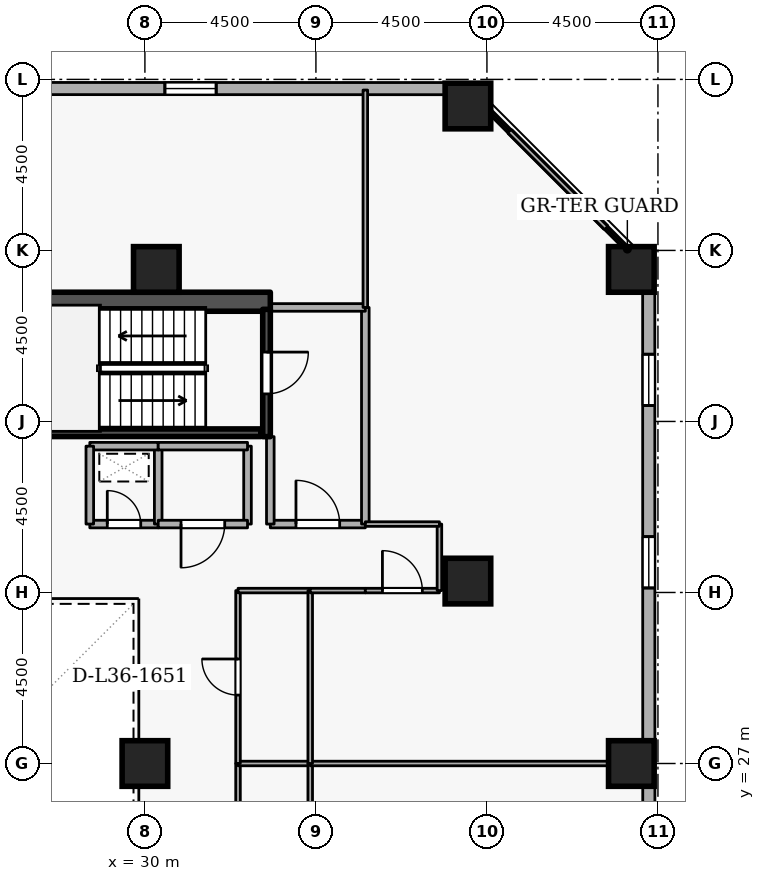
"""IFC4 building model, lengths in metres.
Left out: names, types, materials, properties, quantities, classifications, styles, units other than length and angle.
Written with IfcOpenShell. Run it as: python <this file> out.ifc"""

import sys

from ifc_helpers import new_model, si_unit, direction, frame, frame_2d, origin, origin_2d, place, context, subcontext, project, spatial, rectangle, extrude, element, fill, save


model = new_model("IFC4")
c1 = context("Model", 3, precision=1e-05, world=origin(), true_north=direction((0.0, 1.0)))
c2 = subcontext(c1, "Body", "Model", "MODEL_VIEW")
j1 = project(units=[si_unit("LENGTHUNIT", "METRE"), si_unit("PLANEANGLEUNIT", "RADIAN")], contexts=[c1])
p1 = place(None, origin())
s1 = spatial("IfcSite", under=j1, at=p1, CompositionType="ELEMENT")
p2 = place(p1, origin())
s2 = spatial("IfcBuilding", under=s1, at=p2, CompositionType="ELEMENT")
p3 = place(p2, frame((0.0, 0.0, 137.7)))
s3 = spatial("IfcBuildingStorey", under=s2, at=p3, CompositionType="ELEMENT", Elevation=137.7)
p4 = place(p3, frame((17.7, 39.15, 0.0), z_axis=(0.0, 0.0, 1.0), x_axis=(1.0, 0.0, 0.0)))
e1 = element("IfcWall", 1, at=p4, inside=s3, PredefinedType="SHEAR", context=c2, shape_type="SweptSolid", body=[
    extrude(rectangle(XDim=15.6, YDim=0.5, at=frame_2d((7.8, 0.0))), origin(), (0.0, 0.0, 1.0), 3.6),
])
for number, where, z_axis, x_axis in (
    (2, (42.8, 27.0, 0.0), (0.0, 0.0, 1.0), (1.0, 0.0, 0.0)),
    (3, (42.8, 40.0, 0.0), (0.0, 0.0, 1.0), (1.0, 0.0, 0.0)),
    (4, (38.5, 44.3, 0.0), (0.0, 0.0, 1.0), (1.0, 0.0, 0.0)),
    (5, (38.5, 31.8, 0.0), (0.0, 0.0, 1.0), (1.0, 0.0, 0.0)),
    (6, (30.3, 40.0, 0.0), (0.0, 0.0, 1.0), (1.0, 0.0, 0.0)),
    (7, (30.0, 27.0, 0.0), (0.0, 0.0, 1.0), (1.0, 0.0, 0.0)),
):
    element("IfcColumn", number, at=place(p3, frame(where, z_axis=z_axis, x_axis=x_axis)), inside=s3, PredefinedType="COLUMN", context=c2, shape_type="SweptSolid", body=[
        extrude(rectangle(XDim=1.2, YDim=1.2, at=origin_2d()), origin(), (0.0, 0.0, 1.0), 3.6),
    ])
p5 = place(p3, frame((43.265, 5.819, 0.0), z_axis=(0.0, 0.0, 1.0), x_axis=(-0.000214431216, 0.99999997701, 0.0)))
e8 = element("IfcWall", 8, at=p5, inside=s3, PredefinedType="STANDARD", context=c2, shape_type="SweptSolid", body=[
    extrude(rectangle(XDim=34.156, YDim=0.32, at=frame_2d((17.078, 0.0))), origin(), (0.0, 0.0, 1.0), 2.66),
])
p6 = place(p5, frame((1.8, 0.0, 0.72)))
e9 = element("IfcOpeningElement", 9, at=p6, cuts=e8, PredefinedType="OPENING", context=c2, shape_type="SweptSolid", body=[
    extrude(rectangle(XDim=1.35, YDim=1.05, at=frame_2d((0.675, 0.525))), frame((0.0, 0.17, 0.0), z_axis=(0.0, -1.0, 0.0), x_axis=(1.0, 0.0, 0.0)), (0.0, 0.0, 1.0), 0.34),
])
p7 = place(p5, frame((11.4, 0.0, 0.72)))
e10 = element("IfcOpeningElement", 10, at=p7, cuts=e8, PredefinedType="OPENING", context=c2, shape_type="SweptSolid", body=[
    extrude(rectangle(XDim=1.35, YDim=1.05, at=frame_2d((0.675, 0.525))), frame((0.0, 0.17, 0.0), z_axis=(0.0, -1.0, 0.0), x_axis=(1.0, 0.0, 0.0)), (0.0, 0.0, 1.0), 0.34),
])
p8 = place(p5, frame((16.2, 0.0, 0.72)))
e11 = element("IfcOpeningElement", 11, at=p8, cuts=e8, PredefinedType="OPENING", context=c2, shape_type="SweptSolid", body=[
    extrude(rectangle(XDim=1.35, YDim=1.05, at=frame_2d((0.675, 0.525))), frame((0.0, 0.17, 0.0), z_axis=(0.0, -1.0, 0.0), x_axis=(1.0, 0.0, 0.0)), (0.0, 0.0, 1.0), 0.34),
])
p9 = place(p5, frame((25.8, 0.0, 0.72)))
e12 = element("IfcOpeningElement", 12, at=p9, cuts=e8, PredefinedType="OPENING", context=c2, shape_type="SweptSolid", body=[
    extrude(rectangle(XDim=1.35, YDim=1.05, at=frame_2d((0.675, 0.525))), frame((0.0, 0.17, 0.0), z_axis=(0.0, -1.0, 0.0), x_axis=(1.0, 0.0, 0.0)), (0.0, 0.0, 1.0), 0.34),
])
p10 = place(p5, frame((30.6, 0.0, 0.72)))
e13 = element("IfcOpeningElement", 13, at=p10, cuts=e8, PredefinedType="OPENING", context=c2, shape_type="SweptSolid", body=[
    extrude(rectangle(XDim=1.35, YDim=1.05, at=frame_2d((0.675, 0.525))), frame((0.0, 0.17, 0.0), z_axis=(0.0, -1.0, 0.0), x_axis=(1.0, 0.0, 0.0)), (0.0, 0.0, 1.0), 0.34),
])
p11 = place(p3, frame((38.475, 44.757, 0.0), z_axis=(0.0, 0.0, 1.0), x_axis=(-0.99999997701, 0.000214431216, 0.0)))
e14 = element("IfcWall", 14, at=p11, inside=s3, PredefinedType="STANDARD", context=c2, shape_type="SweptSolid", body=[
    extrude(rectangle(XDim=34.156, YDim=0.32, at=frame_2d((17.078, 0.0))), origin(), (0.0, 0.0, 1.0), 2.66),
])
p12 = place(p11, frame((6.6, 0.0, 0.72)))
e15 = element("IfcOpeningElement", 15, at=p12, cuts=e14, PredefinedType="OPENING", context=c2, shape_type="SweptSolid", body=[
    extrude(rectangle(XDim=1.35, YDim=1.05, at=frame_2d((0.675, 0.525))), frame((0.0, 0.17, 0.0), z_axis=(0.0, -1.0, 0.0), x_axis=(1.0, 0.0, 0.0)), (0.0, 0.0, 1.0), 0.34),
])
p13 = place(p11, frame((16.2, 0.0, 0.72)))
e16 = element("IfcOpeningElement", 16, at=p13, cuts=e14, PredefinedType="OPENING", context=c2, shape_type="SweptSolid", body=[
    extrude(rectangle(XDim=1.35, YDim=1.05, at=frame_2d((0.675, 0.525))), frame((0.0, 0.17, 0.0), z_axis=(0.0, -1.0, 0.0), x_axis=(1.0, 0.0, 0.0)), (0.0, 0.0, 1.0), 0.34),
])
p14 = place(p11, frame((21.0, 0.0, 0.72)))
e17 = element("IfcOpeningElement", 17, at=p14, cuts=e14, PredefinedType="OPENING", context=c2, shape_type="SweptSolid", body=[
    extrude(rectangle(XDim=1.35, YDim=1.05, at=frame_2d((0.675, 0.525))), frame((0.0, 0.17, 0.0), z_axis=(0.0, -1.0, 0.0), x_axis=(1.0, 0.0, 0.0)), (0.0, 0.0, 1.0), 0.34),
])
p15 = place(p11, frame((30.6, 0.0, 0.72)))
e18 = element("IfcOpeningElement", 18, at=p15, cuts=e14, PredefinedType="OPENING", context=c2, shape_type="SweptSolid", body=[
    extrude(rectangle(XDim=1.35, YDim=1.05, at=frame_2d((0.675, 0.525))), frame((0.0, 0.17, 0.0), z_axis=(0.0, -1.0, 0.0), x_axis=(1.0, 0.0, 0.0)), (0.0, 0.0, 1.0), 0.34),
])
p16 = place(p3, frame((33.2, 38.95, 0.0), z_axis=(0.0, 0.0, 1.0), x_axis=(0.0, -1.0, 0.0)))
e19 = element("IfcWall", 19, at=p16, inside=s3, PredefinedType="SHEAR", context=c2, shape_type="SweptSolid", body=[
    extrude(rectangle(XDim=3.35, YDim=0.2, at=frame_2d((1.675, 0.0))), origin(), (0.0, 0.0, 1.0), 3.6),
])
p17 = place(p16, frame((1.125, 0.0, 0.0)))
e20 = element("IfcOpeningElement", 20, at=p17, cuts=e19, PredefinedType="OPENING", context=c2, shape_type="SweptSolid", body=[
    extrude(rectangle(XDim=1.1, YDim=2.1, at=frame_2d((0.55, 1.05))), frame((0.0, 0.11, 0.0), z_axis=(0.0, -1.0, 0.0), x_axis=(1.0, 0.0, 0.0)), (0.0, 0.0, 1.0), 0.22),
])
p18 = place(p3, frame((25.95, 35.703, 0.0), z_axis=(0.0, 0.0, 1.0), x_axis=(1.0, 0.0, 0.0)))
e21 = element("IfcWall", 21, at=p18, inside=s3, PredefinedType="SHEAR", context=c2, shape_type="SweptSolid", body=[
    extrude(rectangle(XDim=7.1, YDim=0.2, at=frame_2d((3.55, 0.0))), origin(), (0.0, 0.0, 1.0), 3.6),
])
p19 = place(p3, frame((33.3, 33.3, 0.0), z_axis=(0.0, 0.0, 1.0), x_axis=(1.0, 0.0, 0.0)))
e22 = element("IfcWall", 22, at=p19, inside=s3, PredefinedType="STANDARD", context=c2, shape_type="SweptSolid", body=[
    extrude(rectangle(XDim=2.5, YDim=0.2, at=frame_2d((1.25, 0.0))), origin(), (0.0, 0.0, 1.0), 3.26),
])
p20 = place(p19, frame((0.675, 0.0, 0.0)))
e23 = element("IfcOpeningElement", 23, at=p20, cuts=e22, PredefinedType="OPENING", context=c2, shape_type="SweptSolid", body=[
    extrude(rectangle(XDim=1.15, YDim=2.1, at=frame_2d((0.575, 1.05))), frame((0.0, 0.11, 0.0), z_axis=(0.0, -1.0, 0.0), x_axis=(1.0, 0.0, 0.0)), (0.0, 0.0, 1.0), 0.22),
])
p21 = place(p3, frame((35.8, 33.3, 0.0), z_axis=(0.0, 0.0, 1.0), x_axis=(0.0, 1.0, 0.0)))
e24 = element("IfcWall", 24, at=p21, inside=s3, PredefinedType="STANDARD", context=c2, shape_type="SweptSolid", body=[
    extrude(rectangle(XDim=5.7, YDim=0.2, at=frame_2d((2.85, 0.0))), origin(), (0.0, 0.0, 1.0), 3.26),
])
p22 = place(p3, frame((35.8, 39.0, 0.0), z_axis=(0.0, 0.0, 1.0), x_axis=(-1.0, 0.0, 0.0)))
e25 = element("IfcWall", 25, at=p22, inside=s3, PredefinedType="STANDARD", context=c2, shape_type="SweptSolid", body=[
    extrude(rectangle(XDim=2.5, YDim=0.2, at=frame_2d((1.25, 0.0))), origin(), (0.0, 0.0, 1.0), 3.26),
])
p23 = place(p3, frame((33.3, 35.6, 0.0), z_axis=(0.0, 0.0, 1.0), x_axis=(0.0, -1.0, 0.0)))
e26 = element("IfcWall", 26, at=p23, inside=s3, PredefinedType="STANDARD", context=c2, shape_type="SweptSolid", body=[
    extrude(rectangle(XDim=2.3, YDim=0.2, at=frame_2d((1.15, 0.0))), origin(), (0.0, 0.0, 1.0), 2.465),
])
p24 = place(p3, frame((28.55, 33.3, 0.0), z_axis=(0.0, 0.0, 1.0), x_axis=(1.0, 0.0, 0.0)))
e27 = element("IfcWall", 27, at=p24, inside=s3, PredefinedType="STANDARD", context=c2, shape_type="SweptSolid", body=[
    extrude(rectangle(XDim=1.8, YDim=0.2, at=frame_2d((0.9, 0.0))), origin(), (0.0, 0.0, 1.0), 3.26),
])
p25 = place(p24, frame((0.46, 0.0, 0.0)))
e28 = element("IfcOpeningElement", 28, at=p25, cuts=e27, PredefinedType="OPENING", context=c2, shape_type="SweptSolid", body=[
    extrude(rectangle(XDim=0.88, YDim=2.04, at=frame_2d((0.44, 1.02))), frame((0.0, 0.11, 0.0), z_axis=(0.0, -1.0, 0.0), x_axis=(1.0, 0.0, 0.0)), (0.0, 0.0, 1.0), 0.22),
])
p26 = place(p3, frame((30.35, 33.3, 0.0), z_axis=(0.0, 0.0, 1.0), x_axis=(0.0, 1.0, 0.0)))
e29 = element("IfcWall", 29, at=p26, inside=s3, PredefinedType="STANDARD", context=c2, shape_type="SweptSolid", body=[
    extrude(rectangle(XDim=2.05, YDim=0.2, at=frame_2d((1.025, 0.0))), origin(), (0.0, 0.0, 1.0), 3.26),
])
p27 = place(p3, frame((30.35, 35.35, 0.0), z_axis=(0.0, 0.0, 1.0), x_axis=(-1.0, 0.0, 0.0)))
e30 = element("IfcWall", 30, at=p27, inside=s3, PredefinedType="STANDARD", context=c2, shape_type="SweptSolid", body=[
    extrude(rectangle(XDim=1.8, YDim=0.2, at=frame_2d((0.9, 0.0))), origin(), (0.0, 0.0, 1.0), 3.26),
])
p28 = place(p3, frame((28.55, 35.35, 0.0), z_axis=(0.0, 0.0, 1.0), x_axis=(0.0, -1.0, 0.0)))
e31 = element("IfcWall", 31, at=p28, inside=s3, PredefinedType="STANDARD", context=c2, shape_type="SweptSolid", body=[
    extrude(rectangle(XDim=2.05, YDim=0.2, at=frame_2d((1.025, 0.0))), origin(), (0.0, 0.0, 1.0), 3.26),
])
p29 = place(p3, frame((32.7, 35.35, 0.0), z_axis=(0.0, 0.0, 1.0), x_axis=(0.0, -1.0, 0.0)))
e32 = element("IfcWall", 32, at=p29, inside=s3, PredefinedType="STANDARD", context=c2, shape_type="SweptSolid", body=[
    extrude(rectangle(XDim=2.05, YDim=0.2, at=frame_2d((1.025, 0.0))), origin(), (0.0, 0.0, 1.0), 2.465),
])
p30 = place(p3, frame((32.7, 33.3, 0.0), z_axis=(0.0, 0.0, 1.0), x_axis=(-1.0, 0.0, 0.0)))
e33 = element("IfcWall", 33, at=p30, inside=s3, PredefinedType="STANDARD", context=c2, shape_type="SweptSolid", body=[
    extrude(rectangle(XDim=2.35, YDim=0.2, at=frame_2d((1.175, 0.0))), origin(), (0.0, 0.0, 1.0), 3.26),
])
p31 = place(p30, frame((0.6, 0.0, 0.0)))
e34 = element("IfcOpeningElement", 34, at=p31, cuts=e33, PredefinedType="OPENING", context=c2, shape_type="SweptSolid", body=[
    extrude(rectangle(XDim=1.15, YDim=2.1, at=frame_2d((0.575, 1.05))), frame((0.0, 0.11, 0.0), z_axis=(0.0, -1.0, 0.0), x_axis=(1.0, 0.0, 0.0)), (0.0, 0.0, 1.0), 0.22),
])
p32 = place(p3, frame((30.35, 35.35, 0.0), z_axis=(0.0, 0.0, 1.0), x_axis=(1.0, 0.0, 0.0)))
e35 = element("IfcWall", 35, at=p32, inside=s3, PredefinedType="STANDARD", context=c2, shape_type="SweptSolid", body=[
    extrude(rectangle(XDim=2.35, YDim=0.2, at=frame_2d((1.175, 0.0))), origin(), (0.0, 0.0, 1.0), 3.26),
])
p33 = place(p3, frame((32.45, 22.45, 0.0), z_axis=(0.0, 0.0, 1.0), x_axis=(0.0, 1.0, 0.0)))
e36 = element("IfcWall", 36, at=p33, inside=s3, PredefinedType="PARTITIONING", context=c2, shape_type="SweptSolid", body=[
    extrude(rectangle(XDim=4.55, YDim=0.12, at=frame_2d((2.275, 0.0))), origin(), (0.0, 0.0, 1.0), 3.26),
])
p34 = place(p33, frame((1.8, 0.0, 0.0)))
e37 = element("IfcOpeningElement", 37, at=p34, cuts=e36, PredefinedType="OPENING", context=c2, shape_type="SweptSolid", body=[
    extrude(rectangle(XDim=0.95, YDim=2.1, at=frame_2d((0.475, 1.05))), frame((0.0, 0.07, 0.0), z_axis=(0.0, -1.0, 0.0), x_axis=(1.0, 0.0, 0.0)), (0.0, 0.0, 1.0), 0.14),
])
p35 = place(p3, frame((32.45, 27.0, 0.0), z_axis=(0.0, 0.0, 1.0), x_axis=(1.0, 0.0, 0.0)))
e38 = element("IfcWall", 38, at=p35, inside=s3, PredefinedType="PARTITIONING", context=c2, shape_type="SweptSolid", body=[
    extrude(rectangle(XDim=1.9, YDim=0.12, at=frame_2d((0.95, 0.0))), origin(), (0.0, 0.0, 1.0), 2.802),
])
p36 = place(p3, frame((34.35, 27.0, 0.0), z_axis=(0.0, 0.0, 1.0), x_axis=(0.0, -1.0, 0.0)))
e39 = element("IfcWall", 39, at=p36, inside=s3, PredefinedType="PARTITIONING", context=c2, shape_type="SweptSolid", body=[
    extrude(rectangle(XDim=4.55, YDim=0.12, at=frame_2d((2.275, 0.0))), origin(), (0.0, 0.0, 1.0), 3.26),
])
p37 = place(p3, frame((34.35, 27.0, 0.0), z_axis=(0.0, 0.0, 1.0), x_axis=(1.0, 0.0, 0.0)))
e40 = element("IfcWall", 40, at=p37, inside=s3, PredefinedType="PARTITIONING", context=c2, shape_type="SweptSolid", body=[
    extrude(rectangle(XDim=8.87, YDim=0.12, at=frame_2d((4.435, 0.0))), origin(), (0.0, 0.0, 1.0), 2.802),
])
p38 = place(p3, frame((32.45, 27.0, 0.0), z_axis=(0.0, 0.0, 1.0), x_axis=(0.0, 1.0, 0.0)))
e41 = element("IfcWall", 41, at=p38, inside=s3, PredefinedType="PARTITIONING", context=c2, shape_type="SweptSolid", body=[
    extrude(rectangle(XDim=4.55, YDim=0.12, at=frame_2d((2.275, 0.0))), origin(), (0.0, 0.0, 1.0), 3.26),
])
p39 = place(p38, frame((1.8, 0.0, 0.0)))
e42 = element("IfcOpeningElement", 42, at=p39, cuts=e41, PredefinedType="OPENING", context=c2, shape_type="SweptSolid", body=[
    extrude(rectangle(XDim=0.95, YDim=2.1, at=frame_2d((0.475, 1.05))), frame((0.0, 0.07, 0.0), z_axis=(0.0, -1.0, 0.0), x_axis=(1.0, 0.0, 0.0)), (0.0, 0.0, 1.0), 0.14),
])
p40 = place(p3, frame((32.45, 31.55, 0.0), z_axis=(0.0, 0.0, 1.0), x_axis=(1.0, 0.0, 0.0)))
e43 = element("IfcWall", 43, at=p40, inside=s3, PredefinedType="PARTITIONING", context=c2, shape_type="SweptSolid", body=[
    extrude(rectangle(XDim=1.9, YDim=0.12, at=frame_2d((0.95, 0.0))), origin(), (0.0, 0.0, 1.0), 3.26),
])
p41 = place(p3, frame((34.35, 31.55, 0.0), z_axis=(0.0, 0.0, 1.0), x_axis=(0.0, -1.0, 0.0)))
e44 = element("IfcWall", 44, at=p41, inside=s3, PredefinedType="PARTITIONING", context=c2, shape_type="SweptSolid", body=[
    extrude(rectangle(XDim=4.55, YDim=0.12, at=frame_2d((2.275, 0.0))), origin(), (0.0, 0.0, 1.0), 3.26),
])
p42 = place(p3, frame((34.35, 31.55, 0.0), z_axis=(0.0, 0.0, 1.0), x_axis=(1.0, 0.0, 0.0)))
e45 = element("IfcWall", 45, at=p42, inside=s3, PredefinedType="PARTITIONING", context=c2, shape_type="SweptSolid", body=[
    extrude(rectangle(XDim=1.45, YDim=0.12, at=frame_2d((0.725, 0.0))), origin(), (0.0, 0.0, 1.0), 3.26),
])
p43 = place(p3, frame((35.8, 31.55, 0.0), z_axis=(0.0, 0.0, 1.0), x_axis=(1.0, 0.0, 0.0)))
e46 = element("IfcWall", 46, at=p43, inside=s3, PredefinedType="PARTITIONING", context=c2, shape_type="SweptSolid", body=[
    extrude(rectangle(XDim=1.95, YDim=0.12, at=frame_2d((0.975, 0.0))), origin(), (0.0, 0.0, 1.0), 3.26),
])
p44 = place(p43, frame((0.45, 0.0, 0.0)))
e47 = element("IfcOpeningElement", 47, at=p44, cuts=e46, PredefinedType="OPENING", context=c2, shape_type="SweptSolid", body=[
    extrude(rectangle(XDim=1.05, YDim=2.1, at=frame_2d((0.525, 1.05))), frame((0.0, 0.07, 0.0), z_axis=(0.0, -1.0, 0.0), x_axis=(1.0, 0.0, 0.0)), (0.0, 0.0, 1.0), 0.14),
])
p45 = place(p3, frame((37.75, 31.55, 0.0), z_axis=(0.0, 0.0, 1.0), x_axis=(0.0, 1.0, 0.0)))
e48 = element("IfcWall", 48, at=p45, inside=s3, PredefinedType="PARTITIONING", context=c2, shape_type="SweptSolid", body=[
    extrude(rectangle(XDim=1.75, YDim=0.12, at=frame_2d((0.875, 0.0))), origin(), (0.0, 0.0, 1.0), 3.26),
])
p46 = place(p3, frame((37.75, 33.3, 0.0), z_axis=(0.0, 0.0, 1.0), x_axis=(-1.0, 0.0, 0.0)))
e49 = element("IfcWall", 49, at=p46, inside=s3, PredefinedType="PARTITIONING", context=c2, shape_type="SweptSolid", body=[
    extrude(rectangle(XDim=1.95, YDim=0.12, at=frame_2d((0.975, 0.0))), origin(), (0.0, 0.0, 1.0), 3.26),
])
p47 = place(p3, frame((35.8, 39.0, 0.0), z_axis=(0.0, 0.0, 1.0), x_axis=(0.0, 1.0, 0.0)))
e50 = element("IfcWall", 50, at=p47, inside=s3, PredefinedType="PARTITIONING", context=c2, shape_type="SweptSolid", body=[
    extrude(rectangle(XDim=5.72, YDim=0.12, at=frame_2d((2.86, 0.0))), origin(), (0.0, 0.0, 1.0), 3.26),
])
p48 = place(p3, frame((38.51, 44.72, 0.0), z_axis=(0.0, 0.0, 1.0), x_axis=(0.707106781187, -0.707106781187, 0.0)))
e51 = element("IfcWall", 51, at=p48, inside=s3, PredefinedType="PARTITIONING", context=c2, shape_type="SweptSolid", body=[
    extrude(rectangle(XDim=6.66, YDim=0.12, at=frame_2d((3.33, 0.0))), origin(), (0.0, 0.0, 1.0), 3.26),
])
p49 = place(p9, origin())
e52 = element("IfcWindow", 52, at=p49, inside=s3, PartitioningType="SINGLE_PANEL", PredefinedType="WINDOW", context=c2, shape_type="SweptSolid", body=[
    extrude(rectangle(XDim=1.35, YDim=1.05, at=frame_2d((0.675, 0.525))), frame((0.0, 0.03, 0.0), z_axis=(0.0, -1.0, 0.0), x_axis=(1.0, 0.0, 0.0)), (0.0, 0.0, 1.0), 0.06),
])
fill(e12, e52)
p50 = place(p10, origin())
e53 = element("IfcWindow", 53, at=p50, inside=s3, PartitioningType="SINGLE_PANEL", PredefinedType="WINDOW", context=c2, shape_type="SweptSolid", body=[
    extrude(rectangle(XDim=1.35, YDim=1.05, at=frame_2d((0.675, 0.525))), frame((0.0, 0.03, 0.0), z_axis=(0.0, -1.0, 0.0), x_axis=(1.0, 0.0, 0.0)), (0.0, 0.0, 1.0), 0.06),
])
fill(e13, e53)
p51 = place(p12, origin())
e54 = element("IfcWindow", 54, at=p51, inside=s3, PartitioningType="SINGLE_PANEL", PredefinedType="WINDOW", context=c2, shape_type="SweptSolid", body=[
    extrude(rectangle(XDim=1.35, YDim=1.05, at=frame_2d((0.675, 0.525))), frame((0.0, 0.03, 0.0), z_axis=(0.0, -1.0, 0.0), x_axis=(1.0, 0.0, 0.0)), (0.0, 0.0, 1.0), 0.06),
])
fill(e15, e54)
p52 = place(p17, origin())
e55 = element("IfcDoor", 55, at=p52, inside=s3, OperationType="SINGLE_SWING_LEFT", PredefinedType="DOOR", context=c2, shape_type="SweptSolid", body=[
    extrude(rectangle(XDim=1.1, YDim=2.1, at=frame_2d((0.55, 1.05))), frame((0.0, 0.025, 0.0), z_axis=(0.0, -1.0, 0.0), x_axis=(1.0, 0.0, 0.0)), (0.0, 0.0, 1.0), 0.05),
])
fill(e20, e55)
p53 = place(p20, origin())
e56 = element("IfcDoor", 56, at=p53, inside=s3, OperationType="SINGLE_SWING_LEFT", PredefinedType="DOOR", context=c2, shape_type="SweptSolid", body=[
    extrude(rectangle(XDim=1.15, YDim=2.1, at=frame_2d((0.575, 1.05))), frame((0.0, 0.025, 0.0), z_axis=(0.0, -1.0, 0.0), x_axis=(1.0, 0.0, 0.0)), (0.0, 0.0, 1.0), 0.05),
])
fill(e23, e56)
p54 = place(p25, origin())
e57 = element("IfcDoor", 57, at=p54, inside=s3, OperationType="SINGLE_SWING_LEFT", PredefinedType="DOOR", context=c2, shape_type="SweptSolid", body=[
    extrude(rectangle(XDim=0.88, YDim=2.04, at=frame_2d((0.44, 1.02))), frame((0.0, 0.025, 0.0), z_axis=(0.0, -1.0, 0.0), x_axis=(1.0, 0.0, 0.0)), (0.0, 0.0, 1.0), 0.05),
])
fill(e28, e57)
p55 = place(p31, origin())
e58 = element("IfcDoor", 58, at=p55, inside=s3, OperationType="SINGLE_SWING_RIGHT", PredefinedType="DOOR", context=c2, shape_type="SweptSolid", body=[
    extrude(rectangle(XDim=1.15, YDim=2.1, at=frame_2d((0.575, 1.05))), frame((0.0, 0.025, 0.0), z_axis=(0.0, -1.0, 0.0), x_axis=(1.0, 0.0, 0.0)), (0.0, 0.0, 1.0), 0.05),
])
fill(e34, e58)
p56 = place(p39, origin())
e59 = element("IfcDoor", 59, at=p56, inside=s3, OperationType="SINGLE_SWING_RIGHT", PredefinedType="DOOR", context=c2, shape_type="SweptSolid", body=[
    extrude(rectangle(XDim=0.95, YDim=2.1, at=frame_2d((0.475, 1.05))), frame((0.0, 0.025, 0.0), z_axis=(0.0, -1.0, 0.0), x_axis=(1.0, 0.0, 0.0)), (0.0, 0.0, 1.0), 0.05),
])
fill(e42, e59)
p57 = place(p44, origin())
e60 = element("IfcDoor", 60, at=p57, inside=s3, OperationType="SINGLE_SWING_LEFT", PredefinedType="DOOR", context=c2, shape_type="SweptSolid", body=[
    extrude(rectangle(XDim=1.05, YDim=2.1, at=frame_2d((0.525, 1.05))), frame((0.0, 0.025, 0.0), z_axis=(0.0, -1.0, 0.0), x_axis=(1.0, 0.0, 0.0)), (0.0, 0.0, 1.0), 0.05),
])
fill(e47, e60)
save(model, sys.argv[1])
